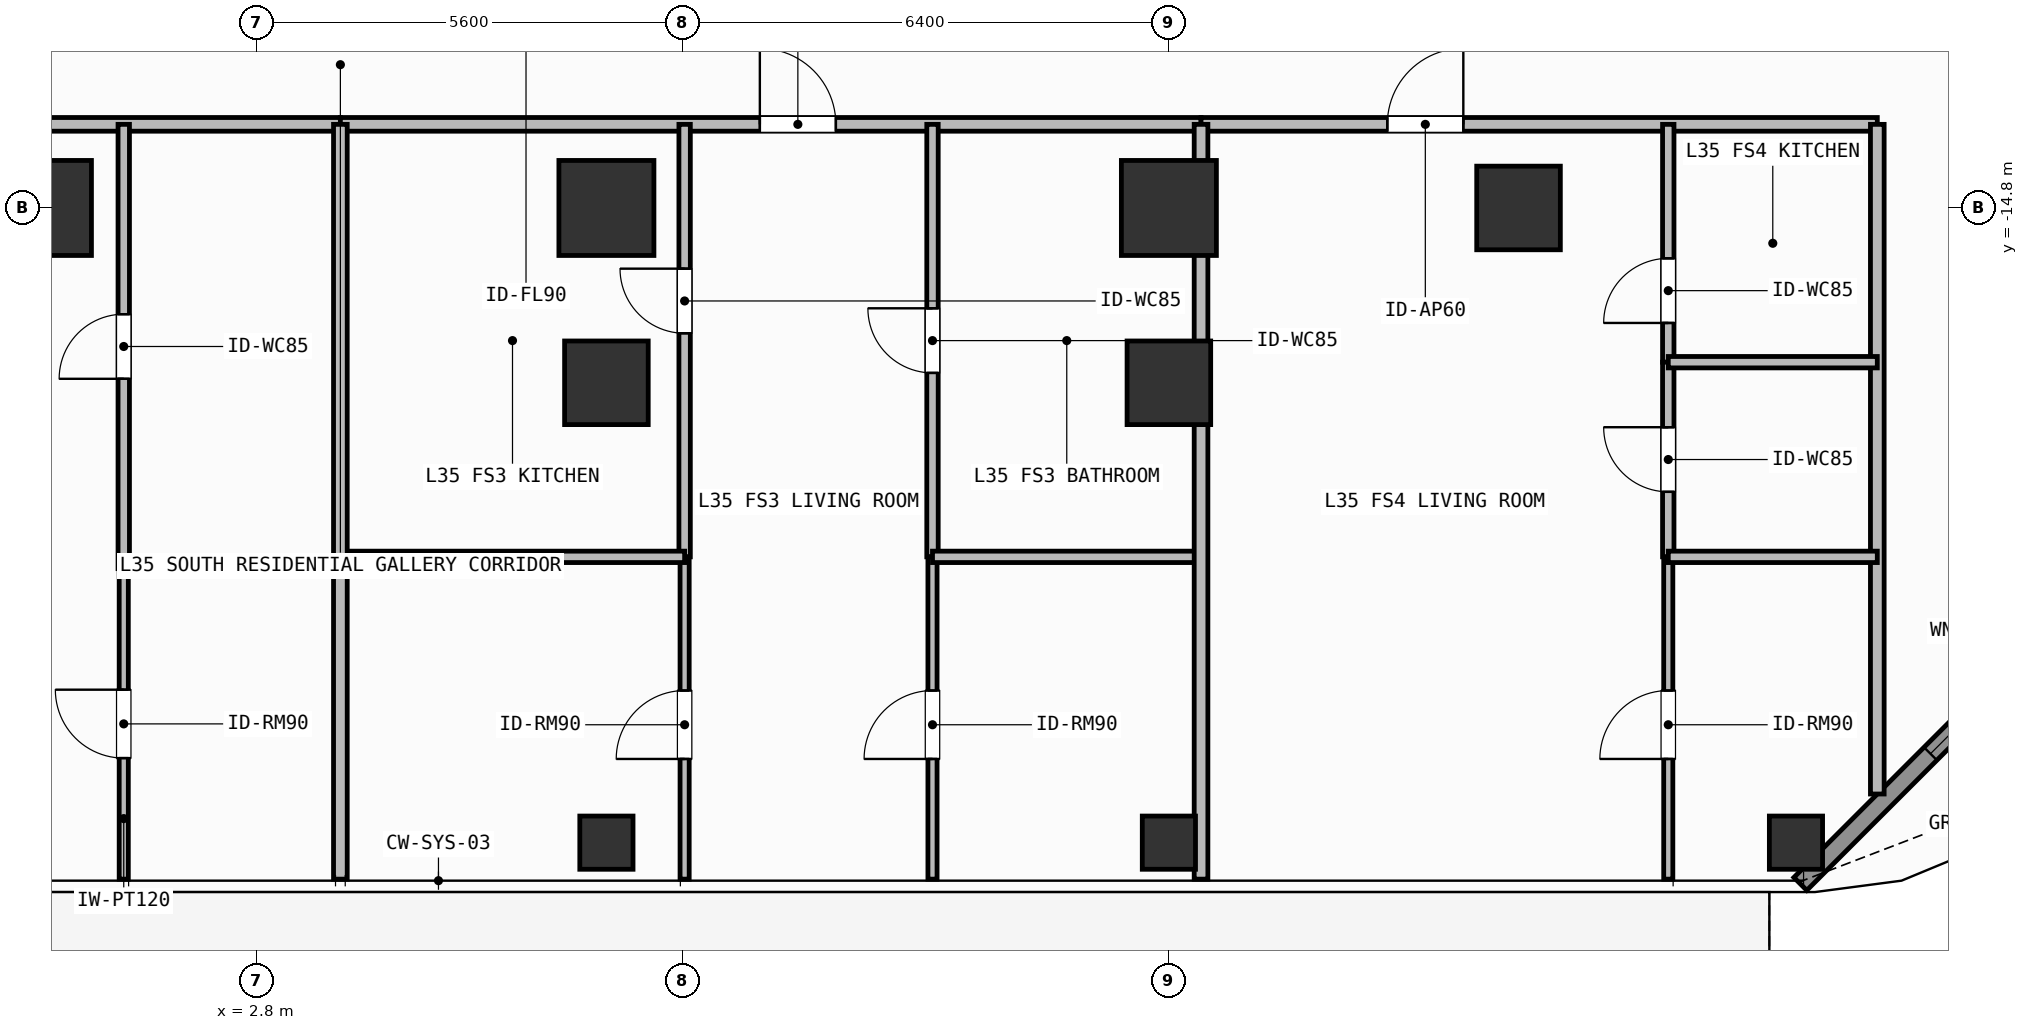
"""IFC4 building model, lengths in metres.
Left out: names, types, materials, properties, quantities, classifications, styles, units other than length and angle.
Written with IfcOpenShell. Run it as: python <this file> out.ifc"""

import sys

from ifc_helpers import new_model, si_unit, direction, frame, frame_2d, origin, origin_2d, place, context, subcontext, project, spatial, rectangle, hollow_rectangle, extrude, element, fill, save


model = new_model("IFC4")
c1 = context("Model", 3, precision=1e-05, world=origin(), true_north=direction((0.0, 1.0)))
c2 = subcontext(c1, "Body", "Model", "MODEL_VIEW")
j1 = project(units=[si_unit("LENGTHUNIT", "METRE"), si_unit("PLANEANGLEUNIT", "RADIAN")], contexts=[c1])
p1 = place(None, origin())
s1 = spatial("IfcSite", under=j1, at=p1, CompositionType="ELEMENT")
p2 = place(p1, origin())
s2 = spatial("IfcBuilding", under=s1, at=p2, CompositionType="ELEMENT")
p3 = place(p2, frame((0.0, 0.0, 140.7)))
s3 = spatial("IfcBuildingStorey", under=s2, at=p3, CompositionType="ELEMENT", Elevation=140.7)
for number, where, z_axis, x_axis in (
    (1, (0.0, -14.8, 0.0), (0.0, 0.0, 1.0), (1.0, 0.0, 0.0)),
    (2, (7.4, -14.8, 0.0), (0.0, 0.0, 1.0), (1.0, 0.0, 0.0)),
    (3, (14.8, -14.8, 0.0), (0.0, 0.0, 1.0), (1.0, 0.0, 0.0)),
):
    element("IfcColumn", number, at=place(p3, frame(where, z_axis=z_axis, x_axis=x_axis)), inside=s3, PredefinedType="COLUMN", context=c2, shape_type="SweptSolid", body=[
        extrude(rectangle(XDim=1.25, YDim=1.25, at=origin_2d()), origin(), (0.0, 0.0, 1.0), 3.9),
    ])
for number, where, z_axis, x_axis in (
    (4, (19.4, -14.8, 0.0), (0.0, 0.0, 1.0), (1.0, 0.0, 0.0)),
    (5, (7.4, -17.1, 0.0), (0.0, 0.0, 1.0), (1.0, 0.0, 0.0)),
    (6, (14.8, -17.1, 0.0), (0.0, 0.0, 1.0), (1.0, 0.0, 0.0)),
):
    element("IfcColumn", number, at=place(p3, frame(where, z_axis=z_axis, x_axis=x_axis)), inside=s3, PredefinedType="COLUMN", context=c2, shape_type="SweptSolid", body=[
        extrude(rectangle(XDim=1.1, YDim=1.1, at=origin_2d()), origin(), (0.0, 0.0, 1.0), 3.9),
    ])
for number, where, z_axis, x_axis in (
    (7, (23.05, -23.15, 0.0), (0.0, 0.0, 1.0), (1.0, 0.0, 0.0)),
    (8, (7.4, -23.15, 0.0), (0.0, 0.0, 1.0), (1.0, 0.0, 0.0)),
    (9, (14.8, -23.15, 0.0), (0.0, 0.0, 1.0), (1.0, 0.0, 0.0)),
):
    element("IfcColumn", number, at=place(p3, frame(where, z_axis=z_axis, x_axis=x_axis)), inside=s3, PredefinedType="COLUMN", context=c2, shape_type="SweptSolid", body=[
        extrude(hollow_rectangle(XDim=0.7, YDim=0.7, WallThickness=0.032, at=origin_2d()), origin(), (0.0, 0.0, 1.0), 3.9),
    ])
p4 = place(p3, frame((27.592, -19.208, 0.0), z_axis=(0.0, 0.0, 1.0), x_axis=(-0.707087534163, -0.707126027686, 0.0)))
e10 = element("IfcWall", 10, at=p4, inside=s3, PredefinedType="SOLIDWALL", context=c2, shape_type="SweptSolid", body=[
    extrude(rectangle(XDim=6.342, YDim=0.24, at=frame_2d((3.171, 0.0))), origin(), (0.0, 0.0, 1.0), 3.68),
])
p5 = place(p4, frame((2.421, 0.0, 0.8)))
e11 = element("IfcOpeningElement", 11, at=p5, cuts=e10, PredefinedType="OPENING", context=c2, shape_type="SweptSolid", body=[
    extrude(rectangle(XDim=1.5, YDim=1.85, at=frame_2d((0.75, 0.925))), frame((0.0, 0.13, 0.0), z_axis=(0.0, -1.0, 0.0), x_axis=(1.0, 0.0, 0.0)), (0.0, 0.0, 1.0), 0.26),
])
p6 = place(p3, frame((-7.423, -13.7, 0.0), z_axis=(0.0, 0.0, 1.0), x_axis=(1.0, 0.0, 0.0)))
e12 = element("IfcWall", 12, at=p6, inside=s3, PredefinedType="PARTITIONING", context=c2, shape_type="SweptSolid", body=[
    extrude(rectangle(XDim=11.323, YDim=0.18, at=frame_2d((5.662, 0.0))), origin(), (0.0, 0.0, 1.0), 3.68),
])
p7 = place(p6, frame((5.34, 0.0, 0.0)))
e13 = element("IfcOpeningElement", 13, at=p7, cuts=e12, PredefinedType="OPENING", context=c2, shape_type="SweptSolid", body=[
    extrude(rectangle(XDim=1.0, YDim=2.2, at=frame_2d((0.5, 1.1))), frame((0.0, 0.1, 0.0), z_axis=(0.0, -1.0, 0.0), x_axis=(1.0, 0.0, 0.0)), (0.0, 0.0, 1.0), 0.2),
])
p8 = place(p3, frame((1.05, -19.545, 0.0), z_axis=(0.0, 0.0, 1.0), x_axis=(0.0, 1.0, 0.0)))
e14 = element("IfcWall", 14, at=p8, inside=s3, PredefinedType="PARTITIONING", context=c2, shape_type="SweptSolid", body=[
    extrude(rectangle(XDim=5.845, YDim=0.15, at=frame_2d((2.922, 0.0))), origin(), (0.0, 0.0, 1.0), 3.68),
])
p9 = place(p8, frame((2.498, 0.0, 0.0)))
e15 = element("IfcOpeningElement", 15, at=p9, cuts=e14, PredefinedType="OPENING", context=c2, shape_type="SweptSolid", body=[
    extrude(rectangle(XDim=0.85, YDim=2.1, at=frame_2d((0.425, 1.05))), frame((0.0, 0.085, 0.0), z_axis=(0.0, -1.0, 0.0), x_axis=(1.0, 0.0, 0.0)), (0.0, 0.0, 1.0), 0.17),
])
p10 = place(p3, frame((1.05, -23.63, 0.0), z_axis=(0.0, 0.0, 1.0), x_axis=(0.0, 1.0, 0.0)))
e16 = element("IfcWall", 16, at=p10, inside=s3, PredefinedType="PARTITIONING", context=c2, shape_type="SweptSolid", body=[
    extrude(rectangle(XDim=4.085, YDim=0.12, at=frame_2d((2.042, 0.0))), origin(), (0.0, 0.0, 1.0), 3.68),
])
p11 = place(p10, frame((1.593, 0.0, 0.0)))
e17 = element("IfcOpeningElement", 17, at=p11, cuts=e16, PredefinedType="OPENING", context=c2, shape_type="SweptSolid", body=[
    extrude(rectangle(XDim=0.9, YDim=2.1, at=frame_2d((0.45, 1.05))), frame((0.0, 0.07, 0.0), z_axis=(0.0, -1.0, 0.0), x_axis=(1.0, 0.0, 0.0)), (0.0, 0.0, 1.0), 0.14),
])
p12 = place(p3, frame((3.9, -13.7, 0.0), z_axis=(0.0, 0.0, 1.0), x_axis=(1.0, 0.0, 0.0)))
e18 = element("IfcWall", 18, at=p12, inside=s3, PredefinedType="PARTITIONING", context=c2, shape_type="SweptSolid", body=[
    extrude(rectangle(XDim=11.323, YDim=0.18, at=frame_2d((5.662, 0.0))), origin(), (0.0, 0.0, 1.0), 3.68),
])
p13 = place(p12, frame((5.519, 0.0, 0.0)))
e19 = element("IfcOpeningElement", 19, at=p13, cuts=e18, PredefinedType="OPENING", context=c2, shape_type="SweptSolid", body=[
    extrude(rectangle(XDim=1.0, YDim=2.2, at=frame_2d((0.5, 1.1))), frame((0.0, 0.1, 0.0), z_axis=(0.0, -1.0, 0.0), x_axis=(1.0, 0.0, 0.0)), (0.0, 0.0, 1.0), 0.2),
])
p14 = place(p3, frame((8.429, -19.39, 0.0), z_axis=(0.0, 0.0, 1.0), x_axis=(0.0, 1.0, 0.0)))
e20 = element("IfcWall", 20, at=p14, inside=s3, PredefinedType="PARTITIONING", context=c2, shape_type="SweptSolid", body=[
    extrude(rectangle(XDim=5.69, YDim=0.15, at=frame_2d((2.845, 0.0))), origin(), (0.0, 0.0, 1.0), 3.68),
])
p15 = place(p14, frame((2.941, 0.0, 0.0)))
e21 = element("IfcOpeningElement", 21, at=p15, cuts=e20, PredefinedType="OPENING", context=c2, shape_type="SweptSolid", body=[
    extrude(rectangle(XDim=0.85, YDim=2.1, at=frame_2d((0.425, 1.05))), frame((0.0, 0.085, 0.0), z_axis=(0.0, -1.0, 0.0), x_axis=(1.0, 0.0, 0.0)), (0.0, 0.0, 1.0), 0.17),
])
p16 = place(p3, frame((8.429, -23.63, 0.0), z_axis=(0.0, 0.0, 1.0), x_axis=(0.0, 1.0, 0.0)))
e22 = element("IfcWall", 22, at=p16, inside=s3, PredefinedType="PARTITIONING", context=c2, shape_type="SweptSolid", body=[
    extrude(rectangle(XDim=4.24, YDim=0.12, at=frame_2d((2.12, 0.0))), origin(), (0.0, 0.0, 1.0), 3.68),
])
p17 = place(p16, frame((1.581, 0.0, 0.0)))
e23 = element("IfcOpeningElement", 23, at=p17, cuts=e22, PredefinedType="OPENING", context=c2, shape_type="SweptSolid", body=[
    extrude(rectangle(XDim=0.9, YDim=2.1, at=frame_2d((0.45, 1.05))), frame((0.0, 0.07, 0.0), z_axis=(0.0, -1.0, 0.0), x_axis=(1.0, 0.0, 0.0)), (0.0, 0.0, 1.0), 0.14),
])
p18 = place(p3, frame((11.69, -19.39, 0.0), z_axis=(0.0, 0.0, 1.0), x_axis=(0.0, 1.0, 0.0)))
e24 = element("IfcWall", 24, at=p18, inside=s3, PredefinedType="PARTITIONING", context=c2, shape_type="SweptSolid", body=[
    extrude(rectangle(XDim=5.69, YDim=0.15, at=frame_2d((2.845, 0.0))), origin(), (0.0, 0.0, 1.0), 3.68),
])
p19 = place(p18, frame((2.42, 0.0, 0.0)))
e25 = element("IfcOpeningElement", 25, at=p19, cuts=e24, PredefinedType="OPENING", context=c2, shape_type="SweptSolid", body=[
    extrude(rectangle(XDim=0.85, YDim=2.1, at=frame_2d((0.425, 1.05))), frame((0.0, 0.085, 0.0), z_axis=(0.0, -1.0, 0.0), x_axis=(1.0, 0.0, 0.0)), (0.0, 0.0, 1.0), 0.17),
])
p20 = place(p3, frame((11.69, -23.63, 0.0), z_axis=(0.0, 0.0, 1.0), x_axis=(0.0, 1.0, 0.0)))
e26 = element("IfcWall", 26, at=p20, inside=s3, PredefinedType="PARTITIONING", context=c2, shape_type="SweptSolid", body=[
    extrude(rectangle(XDim=4.24, YDim=0.12, at=frame_2d((2.12, 0.0))), origin(), (0.0, 0.0, 1.0), 3.68),
])
p21 = place(p20, frame((1.581, 0.0, 0.0)))
e27 = element("IfcOpeningElement", 27, at=p21, cuts=e26, PredefinedType="OPENING", context=c2, shape_type="SweptSolid", body=[
    extrude(rectangle(XDim=0.9, YDim=2.1, at=frame_2d((0.45, 1.05))), frame((0.0, 0.07, 0.0), z_axis=(0.0, -1.0, 0.0), x_axis=(1.0, 0.0, 0.0)), (0.0, 0.0, 1.0), 0.14),
])
p22 = place(p3, frame((15.223, -13.7, 0.0), z_axis=(0.0, 0.0, 1.0), x_axis=(1.0, 0.0, 0.0)))
e28 = element("IfcWall", 28, at=p22, inside=s3, PredefinedType="PARTITIONING", context=c2, shape_type="SweptSolid", body=[
    extrude(rectangle(XDim=8.897, YDim=0.18, at=frame_2d((4.449, 0.0))), origin(), (0.0, 0.0, 1.0), 3.68),
])
p23 = place(p22, frame((2.451, 0.0, 0.0)))
e29 = element("IfcOpeningElement", 29, at=p23, cuts=e28, PredefinedType="OPENING", context=c2, shape_type="SweptSolid", body=[
    extrude(rectangle(XDim=1.0, YDim=2.2, at=frame_2d((0.5, 1.1))), frame((0.0, 0.1, 0.0), z_axis=(0.0, -1.0, 0.0), x_axis=(1.0, 0.0, 0.0)), (0.0, 0.0, 1.0), 0.2),
])
p24 = place(p3, frame((21.37, -16.829, 0.0), z_axis=(0.0, 0.0, 1.0), x_axis=(0.0, 1.0, 0.0)))
e30 = element("IfcWall", 30, at=p24, inside=s3, PredefinedType="PARTITIONING", context=c2, shape_type="SweptSolid", body=[
    extrude(rectangle(XDim=3.129, YDim=0.15, at=frame_2d((1.564, 0.0))), origin(), (0.0, 0.0, 1.0), 3.68),
])
p25 = place(p24, frame((0.516, 0.0, 0.0)))
e31 = element("IfcOpeningElement", 31, at=p25, cuts=e30, PredefinedType="OPENING", context=c2, shape_type="SweptSolid", body=[
    extrude(rectangle(XDim=0.85, YDim=2.1, at=frame_2d((0.425, 1.05))), frame((0.0, 0.085, 0.0), z_axis=(0.0, -1.0, 0.0), x_axis=(1.0, 0.0, 0.0)), (0.0, 0.0, 1.0), 0.17),
])
p26 = place(p3, frame((21.37, -19.39, 0.0), z_axis=(0.0, 0.0, 1.0), x_axis=(0.0, 1.0, 0.0)))
e32 = element("IfcWall", 32, at=p26, inside=s3, PredefinedType="PARTITIONING", context=c2, shape_type="SweptSolid", body=[
    extrude(rectangle(XDim=2.561, YDim=0.15, at=frame_2d((1.28, 0.0))), origin(), (0.0, 0.0, 1.0), 3.68),
])
p27 = place(p26, frame((0.855, 0.0, 0.0)))
e33 = element("IfcOpeningElement", 33, at=p27, cuts=e32, PredefinedType="OPENING", context=c2, shape_type="SweptSolid", body=[
    extrude(rectangle(XDim=0.85, YDim=2.1, at=frame_2d((0.425, 1.05))), frame((0.0, 0.085, 0.0), z_axis=(0.0, -1.0, 0.0), x_axis=(1.0, 0.0, 0.0)), (0.0, 0.0, 1.0), 0.17),
])
p28 = place(p3, frame((21.37, -23.63, 0.0), z_axis=(0.0, 0.0, 1.0), x_axis=(0.0, 1.0, 0.0)))
e34 = element("IfcWall", 34, at=p28, inside=s3, PredefinedType="PARTITIONING", context=c2, shape_type="SweptSolid", body=[
    extrude(rectangle(XDim=4.24, YDim=0.12, at=frame_2d((2.12, 0.0))), origin(), (0.0, 0.0, 1.0), 3.68),
])
p29 = place(p28, frame((1.581, 0.0, 0.0)))
e35 = element("IfcOpeningElement", 35, at=p29, cuts=e34, PredefinedType="OPENING", context=c2, shape_type="SweptSolid", body=[
    extrude(rectangle(XDim=0.9, YDim=2.1, at=frame_2d((0.45, 1.05))), frame((0.0, 0.07, 0.0), z_axis=(0.0, -1.0, 0.0), x_axis=(1.0, 0.0, 0.0)), (0.0, 0.0, 1.0), 0.14),
])
p30 = place(p3, frame((24.12, -22.51, 0.0), z_axis=(0.0, 0.0, 1.0), x_axis=(0.0, 1.0, 0.0)))
e36 = element("IfcWall", 36, at=p30, inside=s3, PredefinedType="PARTITIONING", context=c2, shape_type="SweptSolid", body=[
    extrude(rectangle(XDim=8.81, YDim=0.18, at=frame_2d((4.405, 0.0))), origin(), (0.0, 0.0, 1.0), 3.68),
])
p31 = place(p3, frame((1.05, -19.545, 0.0), z_axis=(0.0, 0.0, 1.0), x_axis=(1.0, 0.0, 0.0)))
e37 = element("IfcWall", 37, at=p31, inside=s3, PredefinedType="PARTITIONING", context=c2, shape_type="SweptSolid", body=[
    extrude(rectangle(XDim=2.85, YDim=0.15, at=frame_2d((1.425, 0.0))), origin(), (0.0, 0.0, 1.0), 3.68),
])
p32 = place(p3, frame((3.9, -19.39, 0.0), z_axis=(0.0, 0.0, 1.0), x_axis=(1.0, 0.0, 0.0)))
e38 = element("IfcWall", 38, at=p32, inside=s3, PredefinedType="PARTITIONING", context=c2, shape_type="SweptSolid", body=[
    extrude(rectangle(XDim=4.529, YDim=0.15, at=frame_2d((2.265, 0.0))), origin(), (0.0, 0.0, 1.0), 3.68),
])
p33 = place(p3, frame((11.69, -19.39, 0.0), z_axis=(0.0, 0.0, 1.0), x_axis=(1.0, 0.0, 0.0)))
e39 = element("IfcWall", 39, at=p33, inside=s3, PredefinedType="PARTITIONING", context=c2, shape_type="SweptSolid", body=[
    extrude(rectangle(XDim=3.533, YDim=0.15, at=frame_2d((1.767, 0.0))), origin(), (0.0, 0.0, 1.0), 3.68),
])
p34 = place(p3, frame((3.9, -23.63, 0.0), z_axis=(0.0, 0.0, 1.0), x_axis=(0.0, 1.0, 0.0)))
e40 = element("IfcWall", 40, at=p34, inside=s3, PredefinedType="PARTITIONING", context=c2, shape_type="SweptSolid", body=[
    extrude(rectangle(XDim=9.93, YDim=0.18, at=frame_2d((4.965, 0.0))), origin(), (0.0, 0.0, 1.0), 3.68),
])
for number, where, z_axis, x_axis in (
    (41, (21.37, -16.829, 0.0), (0.0, 0.0, 1.0), (1.0, 0.0, 0.0)),
    (42, (21.37, -19.39, 0.0), (0.0, 0.0, 1.0), (1.0, 0.0, 0.0)),
):
    element("IfcWall", number, at=place(p3, frame(where, z_axis=z_axis, x_axis=x_axis)), inside=s3, PredefinedType="PARTITIONING", context=c2, shape_type="SweptSolid", body=[
        extrude(rectangle(XDim=2.75, YDim=0.15, at=frame_2d((1.375, 0.0))), origin(), (0.0, 0.0, 1.0), 3.68),
    ])
p35 = place(p3, frame((15.223, -23.63, 0.0), z_axis=(0.0, 0.0, 1.0), x_axis=(0.0, 1.0, 0.0)))
e43 = element("IfcWall", 43, at=p35, inside=s3, PredefinedType="PARTITIONING", context=c2, shape_type="SweptSolid", body=[
    extrude(rectangle(XDim=9.93, YDim=0.18, at=frame_2d((4.965, 0.0))), origin(), (0.0, 0.0, 1.0), 3.68),
])
p36 = place(p5, origin())
e44 = element("IfcWindow", 44, at=p36, inside=s3, PartitioningType="SINGLE_PANEL", PredefinedType="WINDOW", context=c2, shape_type="SweptSolid", body=[
    extrude(rectangle(XDim=1.5, YDim=1.85, at=frame_2d((0.75, 0.925))), frame((0.0, 0.03, 0.0), z_axis=(0.0, -1.0, 0.0), x_axis=(1.0, 0.0, 0.0)), (0.0, 0.0, 1.0), 0.06),
])
fill(e11, e44)
p37 = place(p9, origin())
e45 = element("IfcDoor", 45, at=p37, inside=s3, OperationType="SINGLE_SWING_LEFT", PredefinedType="DOOR", context=c2, shape_type="SweptSolid", body=[
    extrude(rectangle(XDim=0.85, YDim=2.1, at=frame_2d((0.425, 1.05))), frame((0.0, 0.025, 0.0), z_axis=(0.0, -1.0, 0.0), x_axis=(1.0, 0.0, 0.0)), (0.0, 0.0, 1.0), 0.05),
])
fill(e15, e45)
p38 = place(p11, origin())
e46 = element("IfcDoor", 46, at=p38, inside=s3, OperationType="SINGLE_SWING_RIGHT", PredefinedType="DOOR", context=c2, shape_type="SweptSolid", body=[
    extrude(rectangle(XDim=0.9, YDim=2.1, at=frame_2d((0.45, 1.05))), frame((0.0, 0.025, 0.0), z_axis=(0.0, -1.0, 0.0), x_axis=(1.0, 0.0, 0.0)), (0.0, 0.0, 1.0), 0.05),
])
fill(e17, e46)
p39 = place(p13, origin())
e47 = element("IfcDoor", 47, at=p39, inside=s3, OperationType="SINGLE_SWING_LEFT", PredefinedType="DOOR", context=c2, shape_type="SweptSolid", body=[
    extrude(rectangle(XDim=1.0, YDim=2.2, at=frame_2d((0.5, 1.1))), frame((0.0, 0.025, 0.0), z_axis=(0.0, -1.0, 0.0), x_axis=(1.0, 0.0, 0.0)), (0.0, 0.0, 1.0), 0.05),
])
fill(e19, e47)
p40 = place(p15, origin())
e48 = element("IfcDoor", 48, at=p40, inside=s3, OperationType="SINGLE_SWING_RIGHT", PredefinedType="DOOR", context=c2, shape_type="SweptSolid", body=[
    extrude(rectangle(XDim=0.85, YDim=2.1, at=frame_2d((0.425, 1.05))), frame((0.0, 0.025, 0.0), z_axis=(0.0, -1.0, 0.0), x_axis=(1.0, 0.0, 0.0)), (0.0, 0.0, 1.0), 0.05),
])
fill(e21, e48)
p41 = place(p17, origin())
e49 = element("IfcDoor", 49, at=p41, inside=s3, OperationType="SINGLE_SWING_LEFT", PredefinedType="DOOR", context=c2, shape_type="SweptSolid", body=[
    extrude(rectangle(XDim=0.9, YDim=2.1, at=frame_2d((0.45, 1.05))), frame((0.0, 0.025, 0.0), z_axis=(0.0, -1.0, 0.0), x_axis=(1.0, 0.0, 0.0)), (0.0, 0.0, 1.0), 0.05),
])
fill(e23, e49)
p42 = place(p19, origin())
e50 = element("IfcDoor", 50, at=p42, inside=s3, OperationType="SINGLE_SWING_RIGHT", PredefinedType="DOOR", context=c2, shape_type="SweptSolid", body=[
    extrude(rectangle(XDim=0.85, YDim=2.1, at=frame_2d((0.425, 1.05))), frame((0.0, 0.025, 0.0), z_axis=(0.0, -1.0, 0.0), x_axis=(1.0, 0.0, 0.0)), (0.0, 0.0, 1.0), 0.05),
])
fill(e25, e50)
p43 = place(p21, origin())
e51 = element("IfcDoor", 51, at=p43, inside=s3, OperationType="SINGLE_SWING_LEFT", PredefinedType="DOOR", context=c2, shape_type="SweptSolid", body=[
    extrude(rectangle(XDim=0.9, YDim=2.1, at=frame_2d((0.45, 1.05))), frame((0.0, 0.025, 0.0), z_axis=(0.0, -1.0, 0.0), x_axis=(1.0, 0.0, 0.0)), (0.0, 0.0, 1.0), 0.05),
])
fill(e27, e51)
p44 = place(p23, origin())
e52 = element("IfcDoor", 52, at=p44, inside=s3, OperationType="SINGLE_SWING_RIGHT", PredefinedType="DOOR", context=c2, shape_type="SweptSolid", body=[
    extrude(rectangle(XDim=1.0, YDim=2.2, at=frame_2d((0.5, 1.1))), frame((0.0, 0.025, 0.0), z_axis=(0.0, -1.0, 0.0), x_axis=(1.0, 0.0, 0.0)), (0.0, 0.0, 1.0), 0.05),
])
fill(e29, e52)
p45 = place(p25, origin())
e53 = element("IfcDoor", 53, at=p45, inside=s3, OperationType="SINGLE_SWING_LEFT", PredefinedType="DOOR", context=c2, shape_type="SweptSolid", body=[
    extrude(rectangle(XDim=0.85, YDim=2.1, at=frame_2d((0.425, 1.05))), frame((0.0, 0.025, 0.0), z_axis=(0.0, -1.0, 0.0), x_axis=(1.0, 0.0, 0.0)), (0.0, 0.0, 1.0), 0.05),
])
fill(e31, e53)
p46 = place(p27, origin())
e54 = element("IfcDoor", 54, at=p46, inside=s3, OperationType="SINGLE_SWING_RIGHT", PredefinedType="DOOR", context=c2, shape_type="SweptSolid", body=[
    extrude(rectangle(XDim=0.85, YDim=2.1, at=frame_2d((0.425, 1.05))), frame((0.0, 0.025, 0.0), z_axis=(0.0, -1.0, 0.0), x_axis=(1.0, 0.0, 0.0)), (0.0, 0.0, 1.0), 0.05),
])
fill(e33, e54)
p47 = place(p29, origin())
e55 = element("IfcDoor", 55, at=p47, inside=s3, OperationType="SINGLE_SWING_LEFT", PredefinedType="DOOR", context=c2, shape_type="SweptSolid", body=[
    extrude(rectangle(XDim=0.9, YDim=2.1, at=frame_2d((0.45, 1.05))), frame((0.0, 0.025, 0.0), z_axis=(0.0, -1.0, 0.0), x_axis=(1.0, 0.0, 0.0)), (0.0, 0.0, 1.0), 0.05),
])
fill(e35, e55)
save(model, sys.argv[1])
